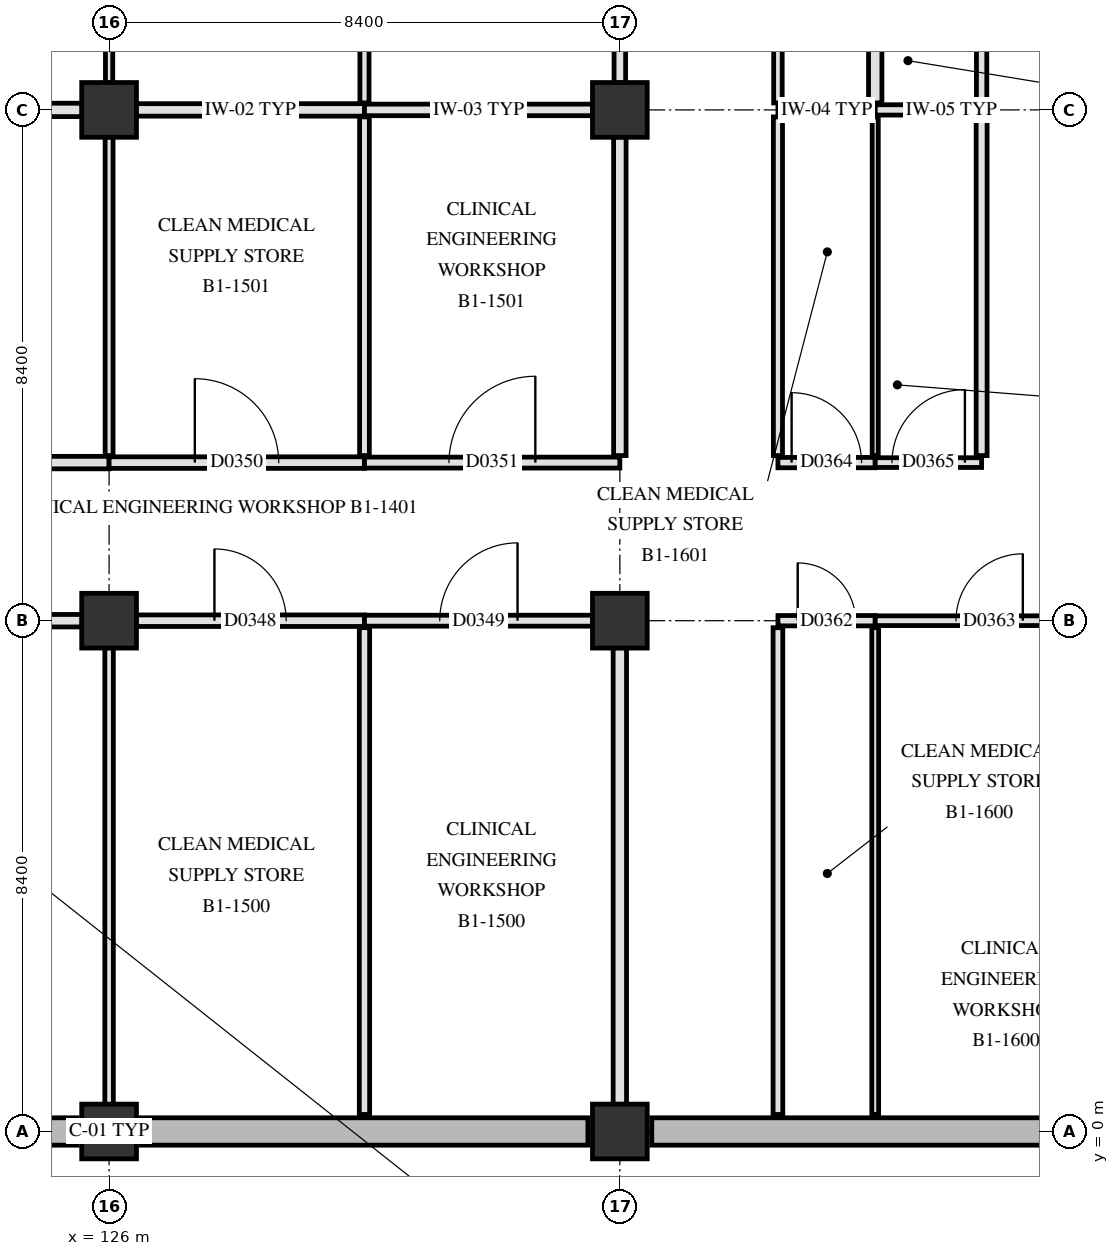
"""IFC4 building model, lengths in metres.
Left out: names, types, materials, properties, quantities, classifications, styles, units other than length and angle.
Written with IfcOpenShell. Run it as: python <this file> out.ifc"""

import sys

from ifc_helpers import new_model, si_unit, direction, frame, frame_2d, origin, origin_2d, place, context, subcontext, project, spatial, rectangle, extrude, element, fill, save


model = new_model("IFC4")
c1 = context("Model", 3, precision=1e-05, world=origin(), true_north=direction((0.0, 1.0)))
c2 = subcontext(c1, "Body", "Model", "MODEL_VIEW")
j1 = project(units=[si_unit("LENGTHUNIT", "METRE"), si_unit("PLANEANGLEUNIT", "RADIAN")], contexts=[c1])
p1 = place(None, origin())
s1 = spatial("IfcSite", under=j1, at=p1, CompositionType="ELEMENT")
p2 = place(p1, origin())
s2 = spatial("IfcBuilding", under=s1, at=p2, CompositionType="ELEMENT")
p3 = place(p2, frame((0.0, 0.0, -5.4)))
s3 = spatial("IfcBuildingStorey", under=s2, at=p3, CompositionType="ELEMENT", Elevation=-5.4)
for number, where, z_axis, x_axis in (
    (1, (126.0, 0.0, 0.0), (0.0, 0.0, 1.0), (1.0, 0.0, 0.0)),
    (2, (126.0, 8.4, 0.0), (0.0, 0.0, 1.0), (1.0, 0.0, 0.0)),
    (3, (126.0, 16.8, 0.0), (0.0, 0.0, 1.0), (1.0, 0.0, 0.0)),
    (4, (134.4, 0.0, 0.0), (0.0, 0.0, 1.0), (1.0, 0.0, 0.0)),
    (5, (134.4, 8.4, 0.0), (0.0, 0.0, 1.0), (1.0, 0.0, 0.0)),
    (6, (134.4, 16.8, 0.0), (0.0, 0.0, 1.0), (1.0, 0.0, 0.0)),
):
    element("IfcColumn", number, at=place(p3, frame(where, z_axis=z_axis, x_axis=x_axis)), inside=s3, PredefinedType="COLUMN", context=c2, shape_type="SweptSolid", body=[
        extrude(rectangle(XDim=0.9, YDim=0.9, at=origin_2d()), origin(), (0.0, 0.0, 1.0), 5.4),
    ])
p4 = place(p3, frame((142.275, 0.0, 0.0), z_axis=(0.0, 0.0, 1.0), x_axis=(-1.0, 0.0, 0.0)))
e7 = element("IfcWall", 7, at=p4, inside=s3, PredefinedType="SOLIDWALL", context=c2, shape_type="SweptSolid", body=[
    extrude(rectangle(XDim=7.35, YDim=0.45, at=frame_2d((3.675, 0.0))), origin(), (0.0, 0.0, 1.0), 5.08),
])
for number, where, z_axis, x_axis in (
    (8, (133.875, 0.0, 0.0), (0.0, 0.0, 1.0), (-1.0, 0.0, 0.0)),
    (9, (125.475, 0.0, 0.0), (0.0, 0.0, 1.0), (-1.0, 0.0, 0.0)),
):
    element("IfcWall", number, at=place(p3, frame(where, z_axis=z_axis, x_axis=x_axis)), inside=s3, PredefinedType="SOLIDWALL", context=c2, shape_type="SweptSolid", body=[
        extrude(rectangle(XDim=7.35, YDim=0.45, at=frame_2d((3.675, 0.0))), origin(), (0.0, 0.0, 1.0), 5.08),
    ])
p5 = place(p3, frame((121.8, 8.4, 0.0), z_axis=(0.0, 0.0, 1.0), x_axis=(1.0, 0.0, 0.0)))
e10 = element("IfcWall", 10, at=p5, inside=s3, PredefinedType="PARTITIONING", context=c2, shape_type="SweptSolid", body=[
    extrude(rectangle(XDim=3.755, YDim=0.205, at=frame_2d((1.877, 0.0))), origin(), (0.0, 0.0, 1.0), 4.42),
])
p6 = place(p5, frame((1.403, 0.0, 0.0)))
e11 = element("IfcOpeningElement", 11, at=p6, cuts=e10, PredefinedType="OPENING", context=c2, shape_type="SweptSolid", body=[
    extrude(rectangle(XDim=0.95, YDim=2.1, at=frame_2d((0.475, 1.05))), frame((0.0, 0.113, 0.0), z_axis=(0.0, -1.0, 0.0), x_axis=(1.0, 0.0, 0.0)), (0.0, 0.0, 1.0), 0.225),
])
p7 = place(p3, frame((126.445, 8.4, 0.0), z_axis=(0.0, 0.0, 1.0), x_axis=(1.0, 0.0, 0.0)))
e12 = element("IfcWall", 12, at=p7, inside=s3, PredefinedType="PARTITIONING", context=c2, shape_type="SweptSolid", body=[
    extrude(rectangle(XDim=3.755, YDim=0.19, at=frame_2d((1.877, 0.0))), origin(), (0.0, 0.0, 1.0), 4.42),
])
p8 = place(p7, frame((1.288, 0.0, 0.0)))
e13 = element("IfcOpeningElement", 13, at=p8, cuts=e12, PredefinedType="OPENING", context=c2, shape_type="SweptSolid", body=[
    extrude(rectangle(XDim=1.18, YDim=2.18, at=frame_2d((0.59, 1.09))), frame((0.0, 0.105, 0.0), z_axis=(0.0, -1.0, 0.0), x_axis=(1.0, 0.0, 0.0)), (0.0, 0.0, 1.0), 0.21),
])
p9 = place(p3, frame((130.2, 8.4, 0.0), z_axis=(0.0, 0.0, 1.0), x_axis=(1.0, 0.0, 0.0)))
e14 = element("IfcWall", 14, at=p9, inside=s3, PredefinedType="PARTITIONING", context=c2, shape_type="SweptSolid", body=[
    extrude(rectangle(XDim=3.755, YDim=0.18, at=frame_2d((1.877, 0.0))), origin(), (0.0, 0.0, 1.0), 4.42),
])
p10 = place(p9, frame((1.238, 0.0, 0.0)))
e15 = element("IfcOpeningElement", 15, at=p10, cuts=e14, PredefinedType="OPENING", context=c2, shape_type="SweptSolid", body=[
    extrude(rectangle(XDim=1.28, YDim=2.18, at=frame_2d((0.64, 1.09))), frame((0.0, 0.1, 0.0), z_axis=(0.0, -1.0, 0.0), x_axis=(1.0, 0.0, 0.0)), (0.0, 0.0, 1.0), 0.2),
])
p11 = place(p3, frame((137.0, 8.4, 0.0), z_axis=(0.0, 0.0, 1.0), x_axis=(1.0, 0.0, 0.0)))
e16 = element("IfcWall", 16, at=p11, inside=s3, PredefinedType="PARTITIONING", context=c2, shape_type="SweptSolid", body=[
    extrude(rectangle(XDim=1.6, YDim=0.17, at=frame_2d((0.8, 0.0))), origin(), (0.0, 0.0, 1.0), 4.42),
])
p12 = place(p11, frame((0.325, 0.0, 0.0)))
e17 = element("IfcOpeningElement", 17, at=p12, cuts=e16, PredefinedType="OPENING", context=c2, shape_type="SweptSolid", body=[
    extrude(rectangle(XDim=0.95, YDim=2.1, at=frame_2d((0.475, 1.05))), frame((0.0, 0.095, 0.0), z_axis=(0.0, -1.0, 0.0), x_axis=(1.0, 0.0, 0.0)), (0.0, 0.0, 1.0), 0.19),
])
p13 = place(p3, frame((138.6, 8.4, 0.0), z_axis=(0.0, 0.0, 1.0), x_axis=(1.0, 0.0, 0.0)))
e18 = element("IfcWall", 18, at=p13, inside=s3, PredefinedType="PARTITIONING", context=c2, shape_type="SweptSolid", body=[
    extrude(rectangle(XDim=3.755, YDim=0.16, at=frame_2d((1.877, 0.0))), origin(), (0.0, 0.0, 1.0), 4.42),
])
p14 = place(p13, frame((1.327, 0.0, 0.0)))
e19 = element("IfcOpeningElement", 19, at=p14, cuts=e18, PredefinedType="OPENING", context=c2, shape_type="SweptSolid", body=[
    extrude(rectangle(XDim=1.1, YDim=2.15, at=frame_2d((0.55, 1.075))), frame((0.0, 0.09, 0.0), z_axis=(0.0, -1.0, 0.0), x_axis=(1.0, 0.0, 0.0)), (0.0, 0.0, 1.0), 0.18),
])
p15 = place(p3, frame((121.8, 11.0, 0.0), z_axis=(0.0, 0.0, 1.0), x_axis=(1.0, 0.0, 0.0)))
e20 = element("IfcWall", 20, at=p15, inside=s3, PredefinedType="PARTITIONING", context=c2, shape_type="SweptSolid", body=[
    extrude(rectangle(XDim=4.2, YDim=0.205, at=frame_2d((2.1, 0.0))), origin(), (0.0, 0.0, 1.0), 4.47),
])
p16 = place(p15, frame((1.525, 0.0, 0.0)))
e21 = element("IfcOpeningElement", 21, at=p16, cuts=e20, PredefinedType="OPENING", context=c2, shape_type="SweptSolid", body=[
    extrude(rectangle(XDim=1.15, YDim=2.15, at=frame_2d((0.575, 1.075))), frame((0.0, 0.113, 0.0), z_axis=(0.0, -1.0, 0.0), x_axis=(1.0, 0.0, 0.0)), (0.0, 0.0, 1.0), 0.225),
])
p17 = place(p3, frame((126.0, 11.0, 0.0), z_axis=(0.0, 0.0, 1.0), x_axis=(1.0, 0.0, 0.0)))
e22 = element("IfcWall", 22, at=p17, inside=s3, PredefinedType="PARTITIONING", context=c2, shape_type="SweptSolid", body=[
    extrude(rectangle(XDim=4.2, YDim=0.19, at=frame_2d((2.1, 0.0))), origin(), (0.0, 0.0, 1.0), 4.47),
])
p18 = place(p17, frame((1.41, 0.0, 0.0)))
e23 = element("IfcOpeningElement", 23, at=p18, cuts=e22, PredefinedType="OPENING", context=c2, shape_type="SweptSolid", body=[
    extrude(rectangle(XDim=1.38, YDim=2.22, at=frame_2d((0.69, 1.11))), frame((0.0, 0.105, 0.0), z_axis=(0.0, -1.0, 0.0), x_axis=(1.0, 0.0, 0.0)), (0.0, 0.0, 1.0), 0.21),
])
p19 = place(p3, frame((130.2, 11.0, 0.0), z_axis=(0.0, 0.0, 1.0), x_axis=(1.0, 0.0, 0.0)))
e24 = element("IfcWall", 24, at=p19, inside=s3, PredefinedType="PARTITIONING", context=c2, shape_type="SweptSolid", body=[
    extrude(rectangle(XDim=4.2, YDim=0.18, at=frame_2d((2.1, 0.0))), origin(), (0.0, 0.0, 1.0), 4.47),
])
p20 = place(p19, frame((1.39, 0.0, 0.0)))
e25 = element("IfcOpeningElement", 25, at=p20, cuts=e24, PredefinedType="OPENING", context=c2, shape_type="SweptSolid", body=[
    extrude(rectangle(XDim=1.42, YDim=2.22, at=frame_2d((0.71, 1.11))), frame((0.0, 0.1, 0.0), z_axis=(0.0, -1.0, 0.0), x_axis=(1.0, 0.0, 0.0)), (0.0, 0.0, 1.0), 0.2),
])
p21 = place(p3, frame((137.0, 11.0, 0.0), z_axis=(0.0, 0.0, 1.0), x_axis=(1.0, 0.0, 0.0)))
e26 = element("IfcWall", 26, at=p21, inside=s3, PredefinedType="PARTITIONING", context=c2, shape_type="SweptSolid", body=[
    extrude(rectangle(XDim=1.6, YDim=0.17, at=frame_2d((0.8, 0.0))), origin(), (0.0, 0.0, 1.0), 5.07),
])
p22 = place(p21, frame((0.225, 0.0, 0.0)))
e27 = element("IfcOpeningElement", 27, at=p22, cuts=e26, PredefinedType="OPENING", context=c2, shape_type="SweptSolid", body=[
    extrude(rectangle(XDim=1.15, YDim=2.15, at=frame_2d((0.575, 1.075))), frame((0.0, 0.095, 0.0), z_axis=(0.0, -1.0, 0.0), x_axis=(1.0, 0.0, 0.0)), (0.0, 0.0, 1.0), 0.19),
])
p23 = place(p3, frame((138.6, 11.0, 0.0), z_axis=(0.0, 0.0, 1.0), x_axis=(1.0, 0.0, 0.0)))
e28 = element("IfcWall", 28, at=p23, inside=s3, PredefinedType="PARTITIONING", context=c2, shape_type="SweptSolid", body=[
    extrude(rectangle(XDim=1.75, YDim=0.16, at=frame_2d((0.875, 0.0))), origin(), (0.0, 0.0, 1.0), 5.07),
])
p24 = place(p23, frame((0.275, 0.0, 0.0)))
e29 = element("IfcOpeningElement", 29, at=p24, cuts=e28, PredefinedType="OPENING", context=c2, shape_type="SweptSolid", body=[
    extrude(rectangle(XDim=1.2, YDim=2.15, at=frame_2d((0.6, 1.075))), frame((0.0, 0.09, 0.0), z_axis=(0.0, -1.0, 0.0), x_axis=(1.0, 0.0, 0.0)), (0.0, 0.0, 1.0), 0.18),
])
p25 = place(p3, frame((121.8, 16.8, 0.0), z_axis=(0.0, 0.0, 1.0), x_axis=(1.0, 0.0, 0.0)))
e30 = element("IfcWall", 30, at=p25, inside=s3, PredefinedType="PARTITIONING", context=c2, shape_type="SweptSolid", body=[
    extrude(rectangle(XDim=3.755, YDim=0.22, at=frame_2d((1.877, 0.0))), origin(), (0.0, 0.0, 1.0), 4.42),
])
p26 = place(p3, frame((126.445, 16.8, 0.0), z_axis=(0.0, 0.0, 1.0), x_axis=(1.0, 0.0, 0.0)))
e31 = element("IfcWall", 31, at=p26, inside=s3, PredefinedType="PARTITIONING", context=c2, shape_type="SweptSolid", body=[
    extrude(rectangle(XDim=3.755, YDim=0.205, at=frame_2d((1.877, 0.0))), origin(), (0.0, 0.0, 1.0), 4.42),
])
p27 = place(p3, frame((130.2, 16.8, 0.0), z_axis=(0.0, 0.0, 1.0), x_axis=(1.0, 0.0, 0.0)))
e32 = element("IfcWall", 32, at=p27, inside=s3, PredefinedType="PARTITIONING", context=c2, shape_type="SweptSolid", body=[
    extrude(rectangle(XDim=3.755, YDim=0.19, at=frame_2d((1.877, 0.0))), origin(), (0.0, 0.0, 1.0), 4.42),
])
p28 = place(p3, frame((137.0, 16.8, 0.0), z_axis=(0.0, 0.0, 1.0), x_axis=(1.0, 0.0, 0.0)))
e33 = element("IfcWall", 33, at=p28, inside=s3, PredefinedType="PARTITIONING", context=c2, shape_type="SweptSolid", body=[
    extrude(rectangle(XDim=1.6, YDim=0.18, at=frame_2d((0.8, 0.0))), origin(), (0.0, 0.0, 1.0), 4.42),
])
p29 = place(p3, frame((138.6, 16.8, 0.0), z_axis=(0.0, 0.0, 1.0), x_axis=(1.0, 0.0, 0.0)))
e34 = element("IfcWall", 34, at=p29, inside=s3, PredefinedType="PARTITIONING", context=c2, shape_type="SweptSolid", body=[
    extrude(rectangle(XDim=1.75, YDim=0.17, at=frame_2d((0.875, 0.0))), origin(), (0.0, 0.0, 1.0), 4.42),
])
p30 = place(p3, frame((126.0, 0.445, 0.0), z_axis=(0.0, 0.0, 1.0), x_axis=(0.0, 1.0, 0.0)))
e35 = element("IfcWall", 35, at=p30, inside=s3, PredefinedType="PARTITIONING", context=c2, shape_type="SweptSolid", body=[
    extrude(rectangle(XDim=7.51, YDim=0.14, at=frame_2d((3.755, 0.0))), origin(), (0.0, 0.0, 1.0), 4.47),
])
p31 = place(p3, frame((126.0, 11.115, 0.0), z_axis=(0.0, 0.0, 1.0), x_axis=(0.0, 1.0, 0.0)))
e36 = element("IfcWall", 36, at=p31, inside=s3, PredefinedType="PARTITIONING", context=c2, shape_type="SweptSolid", body=[
    extrude(rectangle(XDim=5.24, YDim=0.13, at=frame_2d((2.62, 0.0))), origin(), (0.0, 0.0, 1.0), 4.47),
])
p32 = place(p3, frame((126.0, 17.245, 0.0), z_axis=(0.0, 0.0, 1.0), x_axis=(0.0, 1.0, 0.0)))
e37 = element("IfcWall", 37, at=p32, inside=s3, PredefinedType="PARTITIONING", context=c2, shape_type="SweptSolid", body=[
    extrude(rectangle(XDim=5.24, YDim=0.12, at=frame_2d((2.62, 0.0))), origin(), (0.0, 0.0, 1.0), 4.47),
])
p33 = place(p3, frame((130.2, 0.28, 0.0), z_axis=(0.0, 0.0, 1.0), x_axis=(0.0, 1.0, 0.0)))
e38 = element("IfcWall", 38, at=p33, inside=s3, PredefinedType="PARTITIONING", context=c2, shape_type="SweptSolid", body=[
    extrude(rectangle(XDim=8.005, YDim=0.17, at=frame_2d((4.002, 0.0))), origin(), (0.0, 0.0, 1.0), 4.42),
])
p34 = place(p3, frame((130.2, 11.115, 0.0), z_axis=(0.0, 0.0, 1.0), x_axis=(0.0, 1.0, 0.0)))
e39 = element("IfcWall", 39, at=p34, inside=s3, PredefinedType="PARTITIONING", context=c2, shape_type="SweptSolid", body=[
    extrude(rectangle(XDim=5.57, YDim=0.16, at=frame_2d((2.785, 0.0))), origin(), (0.0, 0.0, 1.0), 4.42),
])
p35 = place(p3, frame((130.2, 16.915, 0.0), z_axis=(0.0, 0.0, 1.0), x_axis=(0.0, 1.0, 0.0)))
e40 = element("IfcWall", 40, at=p35, inside=s3, PredefinedType="PARTITIONING", context=c2, shape_type="SweptSolid", body=[
    extrude(rectangle(XDim=5.57, YDim=0.15, at=frame_2d((2.785, 0.0))), origin(), (0.0, 0.0, 1.0), 4.42),
])
p36 = place(p3, frame((134.4, 0.445, 0.0), z_axis=(0.0, 0.0, 1.0), x_axis=(0.0, 1.0, 0.0)))
e41 = element("IfcWall", 41, at=p36, inside=s3, PredefinedType="PARTITIONING", context=c2, shape_type="SweptSolid", body=[
    extrude(rectangle(XDim=7.51, YDim=0.22, at=frame_2d((3.755, 0.0))), origin(), (0.0, 0.0, 1.0), 4.47),
])
p37 = place(p3, frame((134.4, 11.115, 0.0), z_axis=(0.0, 0.0, 1.0), x_axis=(0.0, 1.0, 0.0)))
e42 = element("IfcWall", 42, at=p37, inside=s3, PredefinedType="PARTITIONING", context=c2, shape_type="SweptSolid", body=[
    extrude(rectangle(XDim=5.24, YDim=0.205, at=frame_2d((2.62, 0.0))), origin(), (0.0, 0.0, 1.0), 4.47),
])
p38 = place(p3, frame((134.4, 17.245, 0.0), z_axis=(0.0, 0.0, 1.0), x_axis=(0.0, 1.0, 0.0)))
e43 = element("IfcWall", 43, at=p38, inside=s3, PredefinedType="PARTITIONING", context=c2, shape_type="SweptSolid", body=[
    extrude(rectangle(XDim=5.24, YDim=0.19, at=frame_2d((2.62, 0.0))), origin(), (0.0, 0.0, 1.0), 4.47),
])
p39 = place(p3, frame((137.0, 0.28, 0.0), z_axis=(0.0, 0.0, 1.0), x_axis=(0.0, 1.0, 0.0)))
e44 = element("IfcWall", 44, at=p39, inside=s3, PredefinedType="PARTITIONING", context=c2, shape_type="SweptSolid", body=[
    extrude(rectangle(XDim=8.005, YDim=0.16, at=frame_2d((4.002, 0.0))), origin(), (0.0, 0.0, 1.0), 4.42),
])
p40 = place(p3, frame((137.0, 11.115, 0.0), z_axis=(0.0, 0.0, 1.0), x_axis=(0.0, 1.0, 0.0)))
e45 = element("IfcWall", 45, at=p40, inside=s3, PredefinedType="PARTITIONING", context=c2, shape_type="SweptSolid", body=[
    extrude(rectangle(XDim=5.57, YDim=0.15, at=frame_2d((2.785, 0.0))), origin(), (0.0, 0.0, 1.0), 4.42),
])
p41 = place(p3, frame((137.0, 16.915, 0.0), z_axis=(0.0, 0.0, 1.0), x_axis=(0.0, 1.0, 0.0)))
e46 = element("IfcWall", 46, at=p41, inside=s3, PredefinedType="PARTITIONING", context=c2, shape_type="SweptSolid", body=[
    extrude(rectangle(XDim=5.57, YDim=0.14, at=frame_2d((2.785, 0.0))), origin(), (0.0, 0.0, 1.0), 4.42),
])
p42 = place(p3, frame((138.6, 0.28, 0.0), z_axis=(0.0, 0.0, 1.0), x_axis=(0.0, 1.0, 0.0)))
e47 = element("IfcWall", 47, at=p42, inside=s3, PredefinedType="PARTITIONING", context=c2, shape_type="SweptSolid", body=[
    extrude(rectangle(XDim=8.005, YDim=0.112, at=frame_2d((4.002, 0.0))), origin(), (0.0, 0.0, 1.0), 4.42),
])
p43 = place(p3, frame((138.6, 11.115, 0.0), z_axis=(0.0, 0.0, 1.0), x_axis=(0.0, 1.0, 0.0)))
e48 = element("IfcWall", 48, at=p43, inside=s3, PredefinedType="PARTITIONING", context=c2, shape_type="SweptSolid", body=[
    extrude(rectangle(XDim=5.57, YDim=0.1, at=frame_2d((2.785, 0.0))), origin(), (0.0, 0.0, 1.0), 4.42),
])
p44 = place(p3, frame((138.6, 16.915, 0.0), z_axis=(0.0, 0.0, 1.0), x_axis=(0.0, 1.0, 0.0)))
e49 = element("IfcWall", 49, at=p44, inside=s3, PredefinedType="PARTITIONING", context=c2, shape_type="SweptSolid", body=[
    extrude(rectangle(XDim=5.57, YDim=0.22, at=frame_2d((2.785, 0.0))), origin(), (0.0, 0.0, 1.0), 4.42),
])
p45 = place(p3, frame((140.35, 11.115, 0.0), z_axis=(0.0, 0.0, 1.0), x_axis=(0.0, 1.0, 0.0)))
e50 = element("IfcWall", 50, at=p45, inside=s3, PredefinedType="PARTITIONING", context=c2, shape_type="SweptSolid", body=[
    extrude(rectangle(XDim=5.57, YDim=0.18, at=frame_2d((2.785, 0.0))), origin(), (0.0, 0.0, 1.0), 4.42),
])
p46 = place(p3, frame((140.35, 16.915, 0.0), z_axis=(0.0, 0.0, 1.0), x_axis=(0.0, 1.0, 0.0)))
e51 = element("IfcWall", 51, at=p46, inside=s3, PredefinedType="PARTITIONING", context=c2, shape_type="SweptSolid", body=[
    extrude(rectangle(XDim=2.22, YDim=0.17, at=frame_2d((1.11, 0.0))), origin(), (0.0, 0.0, 1.0), 4.42),
])
p47 = place(p8, origin())
e52 = element("IfcDoor", 52, at=p47, inside=s3, OperationType="SINGLE_SWING_LEFT", PredefinedType="DOOR", context=c2, shape_type="SweptSolid", body=[
    extrude(rectangle(XDim=1.18, YDim=2.18, at=frame_2d((0.59, 1.09))), frame((0.0, 0.025, 0.0), z_axis=(0.0, -1.0, 0.0), x_axis=(1.0, 0.0, 0.0)), (0.0, 0.0, 1.0), 0.05),
])
fill(e13, e52)
p48 = place(p10, origin())
e53 = element("IfcDoor", 53, at=p48, inside=s3, OperationType="SINGLE_SWING_RIGHT", PredefinedType="DOOR", context=c2, shape_type="SweptSolid", body=[
    extrude(rectangle(XDim=1.28, YDim=2.18, at=frame_2d((0.64, 1.09))), frame((0.0, 0.025, 0.0), z_axis=(0.0, -1.0, 0.0), x_axis=(1.0, 0.0, 0.0)), (0.0, 0.0, 1.0), 0.05),
])
fill(e15, e53)
p49 = place(p18, origin())
e54 = element("IfcDoor", 54, at=p49, inside=s3, OperationType="SINGLE_SWING_LEFT", PredefinedType="DOOR", context=c2, shape_type="SweptSolid", body=[
    extrude(rectangle(XDim=1.38, YDim=2.22, at=frame_2d((0.69, 1.11))), frame((0.0, 0.025, 0.0), z_axis=(0.0, -1.0, 0.0), x_axis=(1.0, 0.0, 0.0)), (0.0, 0.0, 1.0), 0.05),
])
fill(e23, e54)
p50 = place(p20, origin())
e55 = element("IfcDoor", 55, at=p50, inside=s3, OperationType="SINGLE_SWING_RIGHT", PredefinedType="DOOR", context=c2, shape_type="SweptSolid", body=[
    extrude(rectangle(XDim=1.42, YDim=2.22, at=frame_2d((0.71, 1.11))), frame((0.0, 0.025, 0.0), z_axis=(0.0, -1.0, 0.0), x_axis=(1.0, 0.0, 0.0)), (0.0, 0.0, 1.0), 0.05),
])
fill(e25, e55)
p51 = place(p12, origin())
e56 = element("IfcDoor", 56, at=p51, inside=s3, OperationType="SINGLE_SWING_LEFT", PredefinedType="DOOR", context=c2, shape_type="SweptSolid", body=[
    extrude(rectangle(XDim=0.95, YDim=2.1, at=frame_2d((0.475, 1.05))), frame((0.0, 0.025, 0.0), z_axis=(0.0, -1.0, 0.0), x_axis=(1.0, 0.0, 0.0)), (0.0, 0.0, 1.0), 0.05),
])
fill(e17, e56)
p52 = place(p14, origin())
e57 = element("IfcDoor", 57, at=p52, inside=s3, OperationType="SINGLE_SWING_RIGHT", PredefinedType="DOOR", context=c2, shape_type="SweptSolid", body=[
    extrude(rectangle(XDim=1.1, YDim=2.15, at=frame_2d((0.55, 1.075))), frame((0.0, 0.025, 0.0), z_axis=(0.0, -1.0, 0.0), x_axis=(1.0, 0.0, 0.0)), (0.0, 0.0, 1.0), 0.05),
])
fill(e19, e57)
p53 = place(p22, origin())
e58 = element("IfcDoor", 58, at=p53, inside=s3, OperationType="SINGLE_SWING_LEFT", PredefinedType="DOOR", context=c2, shape_type="SweptSolid", body=[
    extrude(rectangle(XDim=1.15, YDim=2.15, at=frame_2d((0.575, 1.075))), frame((0.0, 0.025, 0.0), z_axis=(0.0, -1.0, 0.0), x_axis=(1.0, 0.0, 0.0)), (0.0, 0.0, 1.0), 0.05),
])
fill(e27, e58)
p54 = place(p24, origin())
e59 = element("IfcDoor", 59, at=p54, inside=s3, OperationType="SINGLE_SWING_RIGHT", PredefinedType="DOOR", context=c2, shape_type="SweptSolid", body=[
    extrude(rectangle(XDim=1.2, YDim=2.15, at=frame_2d((0.6, 1.075))), frame((0.0, 0.025, 0.0), z_axis=(0.0, -1.0, 0.0), x_axis=(1.0, 0.0, 0.0)), (0.0, 0.0, 1.0), 0.05),
])
fill(e29, e59)
save(model, sys.argv[1])
